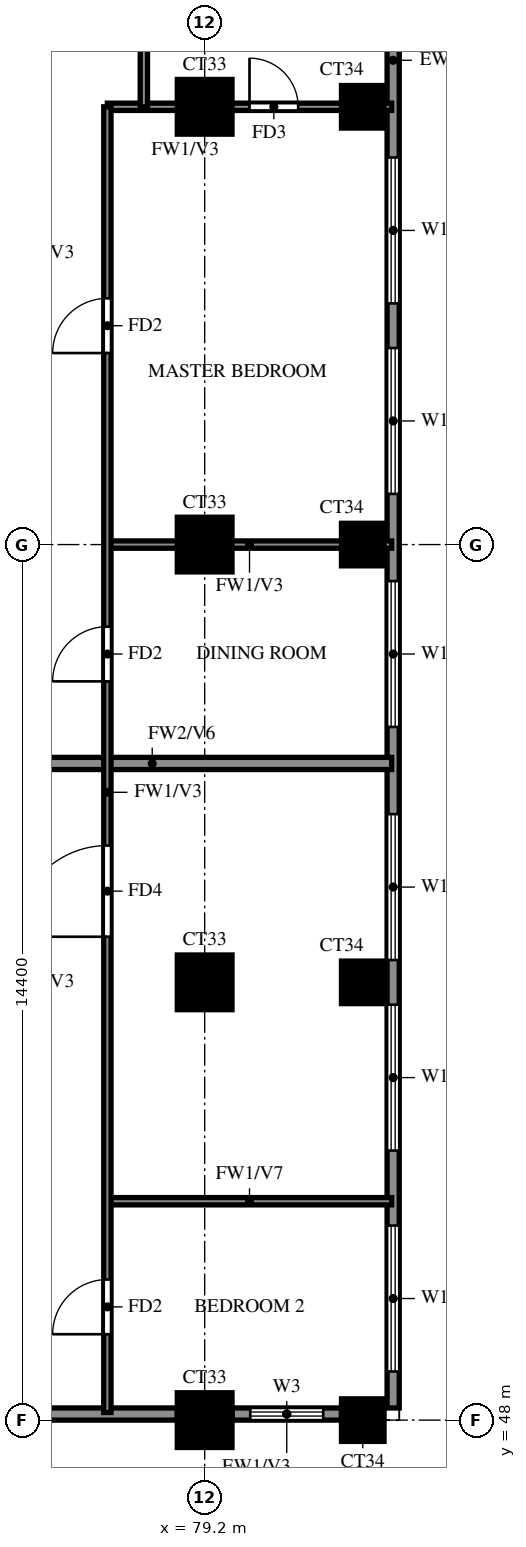
"""IFC4 building model, lengths in metres.
Left out: names, types, materials, properties, quantities, classifications, styles, units other than length and angle.
Written with IfcOpenShell. Run it as: python <this file> out.ifc"""

import sys

from ifc_helpers import new_model, si_unit, direction, frame, frame_2d, origin, origin_2d, place, context, subcontext, project, spatial, rectangle, extrude, source, transform, mapped, element, fill, save


model = new_model("IFC4")
c1 = context("Model", 3, precision=1e-05, world=origin(), true_north=direction((0.0, 1.0)))
c2 = subcontext(c1, "Body", "Model", "MODEL_VIEW")
j1 = project(units=[si_unit("LENGTHUNIT", "METRE"), si_unit("PLANEANGLEUNIT", "RADIAN")], contexts=[c1])
p1 = place(None, origin())
s1 = spatial("IfcSite", under=j1, at=p1, CompositionType="ELEMENT")
p2 = place(p1, origin())
s2 = spatial("IfcBuilding", under=s1, at=p2, CompositionType="ELEMENT")
p3 = place(p2, frame((0.0, 0.0, 215.0)))
s3 = spatial("IfcBuildingStorey", under=s2, at=p3, CompositionType="ELEMENT", Elevation=215.0)
m1 = source(origin(), c2, "Body", "SweptSolid", [
    extrude(rectangle(XDim=0.9, YDim=0.9, at=origin_2d()), origin(), (0.0, 0.0, 1.0), 3.22),
])
p4 = place(p3, frame((79.2, 48.0, 0.0), z_axis=(0.0, 0.0, 1.0), x_axis=(1.0, 0.0, 0.0)))
e1 = element("IfcColumn", 1, at=p4, inside=s3, PredefinedType="COLUMN", context=c2, shape_type="MappedRepresentation", body=[
    mapped(m1, transform((0.0, 0.0, 0.0))),
])
m2 = source(origin(), c2, "Body", "SweptSolid", [
    extrude(rectangle(XDim=0.7, YDim=0.7, at=origin_2d()), origin(), (0.0, 0.0, 1.0), 3.22),
])
p5 = place(p3, frame((81.8, 48.0, 0.0), z_axis=(0.0, 0.0, 1.0), x_axis=(1.0, 0.0, 0.0)))
e2 = element("IfcColumn", 2, at=p5, inside=s3, PredefinedType="COLUMN", context=c2, shape_type="MappedRepresentation", body=[
    mapped(m2, transform((0.0, 0.0, 0.0))),
])
p6 = place(p3, frame((79.2, 55.2, 0.0), z_axis=(0.0, 0.0, 1.0), x_axis=(1.0, 0.0, 0.0)))
e3 = element("IfcColumn", 3, at=p6, inside=s3, PredefinedType="COLUMN", context=c2, shape_type="MappedRepresentation", body=[
    mapped(m1, transform((0.0, 0.0, 0.0))),
])
p7 = place(p3, frame((81.8, 55.2, 0.0), z_axis=(0.0, 0.0, 1.0), x_axis=(1.0, 0.0, 0.0)))
e4 = element("IfcColumn", 4, at=p7, inside=s3, PredefinedType="COLUMN", context=c2, shape_type="MappedRepresentation", body=[
    mapped(m2, transform((0.0, 0.0, 0.0))),
])
p8 = place(p3, frame((79.2, 62.4, 0.0), z_axis=(0.0, 0.0, 1.0), x_axis=(1.0, 0.0, 0.0)))
e5 = element("IfcColumn", 5, at=p8, inside=s3, PredefinedType="COLUMN", context=c2, shape_type="MappedRepresentation", body=[
    mapped(m1, transform((0.0, 0.0, 0.0))),
])
p9 = place(p3, frame((81.8, 62.4, 0.0), z_axis=(0.0, 0.0, 1.0), x_axis=(1.0, 0.0, 0.0)))
e6 = element("IfcColumn", 6, at=p9, inside=s3, PredefinedType="COLUMN", context=c2, shape_type="MappedRepresentation", body=[
    mapped(m2, transform((0.0, 0.0, 0.0))),
])
p10 = place(p3, frame((79.2, 69.6, 0.0), z_axis=(0.0, 0.0, 1.0), x_axis=(1.0, 0.0, 0.0)))
e7 = element("IfcColumn", 7, at=p10, inside=s3, PredefinedType="COLUMN", context=c2, shape_type="MappedRepresentation", body=[
    mapped(m1, transform((0.0, 0.0, 0.0))),
])
p11 = place(p3, frame((81.8, 69.6, 0.0), z_axis=(0.0, 0.0, 1.0), x_axis=(1.0, 0.0, 0.0)))
e8 = element("IfcColumn", 8, at=p11, inside=s3, PredefinedType="COLUMN", context=c2, shape_type="MappedRepresentation", body=[
    mapped(m2, transform((0.0, 0.0, 0.0))),
])
p12 = place(p3, frame((81.907, 39.87, 0.0), z_axis=(0.0, 0.0, 1.0), x_axis=(-0.777936274417, 0.62834318087, 0.0)))
e9 = element("IfcWall", 9, at=p12, inside=s3, PredefinedType="SOLIDWALL", context=c2, shape_type="SweptSolid", body=[
    extrude(rectangle(XDim=13.099, YDim=0.2, at=frame_2d((6.549, 0.0))), origin(), (0.0, 0.0, 1.0), 3.22),
])
p13 = place(p12, frame((9.938, 0.0, 1.5)))
e10 = element("IfcOpeningElement", 10, at=p13, cuts=e9, PredefinedType="OPENING", context=c2, shape_type="SweptSolid", body=[
    extrude(rectangle(XDim=0.9, YDim=0.9, at=frame_2d((0.45, 0.45))), frame((0.0, 0.11, 0.0), z_axis=(0.0, -1.0, 0.0), x_axis=(1.0, 0.0, 0.0)), (0.0, 0.0, 1.0), 0.22),
])
p14 = place(p3, frame((71.987, 48.1, 0.0), z_axis=(0.0, 0.0, 1.0), x_axis=(1.0, 0.0, 0.0)))
e11 = element("IfcWall", 11, at=p14, inside=s3, PredefinedType="SOLIDWALL", context=c2, shape_type="SweptSolid", body=[
    extrude(rectangle(XDim=6.763, YDim=0.2, at=frame_2d((3.381, 0.0))), origin(), (0.0, 0.0, 1.0), 3.22),
])
p15 = place(p3, frame((79.65, 48.1, 0.0), z_axis=(0.0, 0.0, 1.0), x_axis=(1.0, 0.0, 0.0)))
e12 = element("IfcWall", 12, at=p15, inside=s3, PredefinedType="SOLIDWALL", context=c2, shape_type="SweptSolid", body=[
    extrude(rectangle(XDim=1.8, YDim=0.2, at=frame_2d((0.9, 0.0))), origin(), (0.0, 0.0, 1.0), 3.22),
])
p16 = place(p15, frame((0.3, 0.0, 0.6)))
e13 = element("IfcOpeningElement", 13, at=p16, cuts=e12, PredefinedType="OPENING", context=c2, shape_type="SweptSolid", body=[
    extrude(rectangle(XDim=1.2, YDim=2.4, at=frame_2d((0.6, 1.2))), frame((0.0, 0.11, 0.0), z_axis=(0.0, -1.0, 0.0), x_axis=(1.0, 0.0, 0.0)), (0.0, 0.0, 1.0), 0.22),
])
p17 = place(p3, frame((82.3, 48.2, 0.0), z_axis=(0.0, 0.0, 1.0), x_axis=(0.0, 1.0, 0.0)))
e14 = element("IfcWall", 14, at=p17, inside=s3, PredefinedType="SOLIDWALL", context=c2, shape_type="SweptSolid", body=[
    extrude(rectangle(XDim=28.6, YDim=0.2, at=frame_2d((14.3, 0.0))), origin(), (0.0, 0.0, 1.0), 3.22),
])
p18 = place(p17, frame((0.6, 0.0, 0.6)))
e15 = element("IfcOpeningElement", 15, at=p18, cuts=e14, PredefinedType="OPENING", context=c2, shape_type="SweptSolid", body=[
    extrude(rectangle(XDim=2.4, YDim=2.4, at=frame_2d((1.2, 1.2))), frame((0.0, 0.11, 0.0), z_axis=(0.0, -1.0, 0.0), x_axis=(1.0, 0.0, 0.0)), (0.0, 0.0, 1.0), 0.22),
])
p19 = place(p17, frame((4.233, 0.0, 0.6)))
e16 = element("IfcOpeningElement", 16, at=p19, cuts=e14, PredefinedType="OPENING", context=c2, shape_type="SweptSolid", body=[
    extrude(rectangle(XDim=2.4, YDim=2.4, at=frame_2d((1.2, 1.2))), frame((0.0, 0.11, 0.0), z_axis=(0.0, -1.0, 0.0), x_axis=(1.0, 0.0, 0.0)), (0.0, 0.0, 1.0), 0.22),
])
p20 = place(p17, frame((7.367, 0.0, 0.6)))
e17 = element("IfcOpeningElement", 17, at=p20, cuts=e14, PredefinedType="OPENING", context=c2, shape_type="SweptSolid", body=[
    extrude(rectangle(XDim=2.4, YDim=2.4, at=frame_2d((1.2, 1.2))), frame((0.0, 0.11, 0.0), z_axis=(0.0, -1.0, 0.0), x_axis=(1.0, 0.0, 0.0)), (0.0, 0.0, 1.0), 0.22),
])
p21 = place(p17, frame((11.2, 0.0, 0.6)))
e18 = element("IfcOpeningElement", 18, at=p21, cuts=e14, PredefinedType="OPENING", context=c2, shape_type="SweptSolid", body=[
    extrude(rectangle(XDim=2.4, YDim=2.4, at=frame_2d((1.2, 1.2))), frame((0.0, 0.11, 0.0), z_axis=(0.0, -1.0, 0.0), x_axis=(1.0, 0.0, 0.0)), (0.0, 0.0, 1.0), 0.22),
])
p22 = place(p17, frame((15.033, 0.0, 0.6)))
e19 = element("IfcOpeningElement", 19, at=p22, cuts=e14, PredefinedType="OPENING", context=c2, shape_type="SweptSolid", body=[
    extrude(rectangle(XDim=2.4, YDim=2.4, at=frame_2d((1.2, 1.2))), frame((0.0, 0.11, 0.0), z_axis=(0.0, -1.0, 0.0), x_axis=(1.0, 0.0, 0.0)), (0.0, 0.0, 1.0), 0.22),
])
p23 = place(p17, frame((18.167, 0.0, 0.6)))
e20 = element("IfcOpeningElement", 20, at=p23, cuts=e14, PredefinedType="OPENING", context=c2, shape_type="SweptSolid", body=[
    extrude(rectangle(XDim=2.4, YDim=2.4, at=frame_2d((1.2, 1.2))), frame((0.0, 0.11, 0.0), z_axis=(0.0, -1.0, 0.0), x_axis=(1.0, 0.0, 0.0)), (0.0, 0.0, 1.0), 0.22),
])
p24 = place(p17, frame((22.75, 0.0, 1.5)))
e21 = element("IfcOpeningElement", 21, at=p24, cuts=e14, PredefinedType="OPENING", context=c2, shape_type="SweptSolid", body=[
    extrude(rectangle(XDim=0.9, YDim=0.9, at=frame_2d((0.45, 0.45))), frame((0.0, 0.11, 0.0), z_axis=(0.0, -1.0, 0.0), x_axis=(1.0, 0.0, 0.0)), (0.0, 0.0, 1.0), 0.22),
])
p25 = place(p17, frame((25.5, 0.0, 0.6)))
e22 = element("IfcOpeningElement", 22, at=p25, cuts=e14, PredefinedType="OPENING", context=c2, shape_type="SweptSolid", body=[
    extrude(rectangle(XDim=2.4, YDim=2.4, at=frame_2d((1.2, 1.2))), frame((0.0, 0.11, 0.0), z_axis=(0.0, -1.0, 0.0), x_axis=(1.0, 0.0, 0.0)), (0.0, 0.0, 1.0), 0.22),
])
p26 = place(p3, frame((74.4, 58.8, 0.0), z_axis=(0.0, 0.0, 1.0), x_axis=(1.0, 0.0, 0.0)))
e23 = element("IfcWall", 23, at=p26, inside=s3, PredefinedType="SOLIDWALL", context=c2, shape_type="SweptSolid", body=[
    extrude(rectangle(XDim=7.875, YDim=0.2, at=frame_2d((3.938, 0.0))), origin(), (0.0, 0.0, 1.0), 2.32),
])
p27 = place(p3, frame((77.6, 51.6, 0.0), z_axis=(0.0, 0.0, 1.0), x_axis=(1.0, 0.0, 0.0)))
e24 = element("IfcWall", 24, at=p27, inside=s3, PredefinedType="PARTITIONING", context=c2, shape_type="SweptSolid", body=[
    extrude(rectangle(XDim=4.675, YDim=0.12, at=frame_2d((2.337, 0.0))), origin(), (0.0, 0.0, 1.0), 2.32),
])
p28 = place(p3, frame((77.6, 62.4, 0.0), z_axis=(0.0, 0.0, 1.0), x_axis=(1.0, 0.0, 0.0)))
e25 = element("IfcWall", 25, at=p28, inside=s3, PredefinedType="PARTITIONING", context=c2, shape_type="SweptSolid", body=[
    extrude(rectangle(XDim=4.675, YDim=0.12, at=frame_2d((2.337, 0.0))), origin(), (0.0, 0.0, 1.0), 3.22),
])
p29 = place(p3, frame((77.6, 69.6, 0.0), z_axis=(0.0, 0.0, 1.0), x_axis=(1.0, 0.0, 0.0)))
e26 = element("IfcWall", 26, at=p29, inside=s3, PredefinedType="PARTITIONING", context=c2, shape_type="SweptSolid", body=[
    extrude(rectangle(XDim=4.675, YDim=0.12, at=frame_2d((2.337, 0.0))), origin(), (0.0, 0.0, 1.0), 3.22),
])
p30 = place(p29, frame((2.337, 0.0, 0.0)))
e27 = element("IfcOpeningElement", 27, at=p30, cuts=e26, PredefinedType="OPENING", context=c2, shape_type="SweptSolid", body=[
    extrude(rectangle(XDim=0.8, YDim=2.1, at=frame_2d((0.4, 1.05))), frame((0.0, 0.07, 0.0), z_axis=(0.0, -1.0, 0.0), x_axis=(1.0, 0.0, 0.0)), (0.0, 0.0, 1.0), 0.14),
])
p31 = place(p3, frame((77.6, 48.125, 0.0), z_axis=(0.0, 0.0, 1.0), x_axis=(0.0, 1.0, 0.0)))
e28 = element("IfcWall", 28, at=p31, inside=s3, PredefinedType="PARTITIONING", context=c2, shape_type="SweptSolid", body=[
    extrude(rectangle(XDim=21.475, YDim=0.12, at=frame_2d((10.738, 0.0))), origin(), (0.0, 0.0, 1.0), 3.22),
])
p32 = place(p31, frame((1.288, 0.0, 0.0)))
e29 = element("IfcOpeningElement", 29, at=p32, cuts=e28, PredefinedType="OPENING", context=c2, shape_type="SweptSolid", body=[
    extrude(rectangle(XDim=0.9, YDim=2.1, at=frame_2d((0.45, 1.05))), frame((0.0, 0.07, 0.0), z_axis=(0.0, -1.0, 0.0), x_axis=(1.0, 0.0, 0.0)), (0.0, 0.0, 1.0), 0.14),
])
p33 = place(p31, frame((7.825, 0.0, 0.0)))
e30 = element("IfcOpeningElement", 30, at=p33, cuts=e28, PredefinedType="OPENING", context=c2, shape_type="SweptSolid", body=[
    extrude(rectangle(XDim=1.5, YDim=2.1, at=frame_2d((0.75, 1.05))), frame((0.0, 0.07, 0.0), z_axis=(0.0, -1.0, 0.0), x_axis=(1.0, 0.0, 0.0)), (0.0, 0.0, 1.0), 0.14),
])
p34 = place(p31, frame((12.025, 0.0, 0.0)))
e31 = element("IfcOpeningElement", 31, at=p34, cuts=e28, PredefinedType="OPENING", context=c2, shape_type="SweptSolid", body=[
    extrude(rectangle(XDim=0.9, YDim=2.1, at=frame_2d((0.45, 1.05))), frame((0.0, 0.07, 0.0), z_axis=(0.0, -1.0, 0.0), x_axis=(1.0, 0.0, 0.0)), (0.0, 0.0, 1.0), 0.14),
])
p35 = place(p31, frame((17.425, 0.0, 0.0)))
e32 = element("IfcOpeningElement", 32, at=p35, cuts=e28, PredefinedType="OPENING", context=c2, shape_type="SweptSolid", body=[
    extrude(rectangle(XDim=0.9, YDim=2.1, at=frame_2d((0.45, 1.05))), frame((0.0, 0.07, 0.0), z_axis=(0.0, -1.0, 0.0), x_axis=(1.0, 0.0, 0.0)), (0.0, 0.0, 1.0), 0.14),
])
p36 = place(p3, frame((78.2, 69.6, 0.0), z_axis=(0.0, 0.0, 1.0), x_axis=(0.0, 1.0, 0.0)))
e33 = element("IfcWall", 33, at=p36, inside=s3, PredefinedType="PARTITIONING", context=c2, shape_type="SweptSolid", body=[
    extrude(rectangle(XDim=3.6, YDim=0.12, at=frame_2d((1.8, 0.0))), origin(), (0.0, 0.0, 1.0), 3.22),
])
p37 = place(p16, origin())
e34 = element("IfcWindow", 34, at=p37, inside=s3, PartitioningType="SINGLE_PANEL", PredefinedType="WINDOW", context=c2, shape_type="SweptSolid", body=[
    extrude(rectangle(XDim=1.2, YDim=2.4, at=frame_2d((0.6, 1.2))), frame((0.0, 0.03, 0.0), z_axis=(0.0, -1.0, 0.0), x_axis=(1.0, 0.0, 0.0)), (0.0, 0.0, 1.0), 0.06),
])
fill(e13, e34)
p38 = place(p18, origin())
e35 = element("IfcWindow", 35, at=p38, inside=s3, PartitioningType="DOUBLE_PANEL_VERTICAL", PredefinedType="WINDOW", context=c2, shape_type="SweptSolid", body=[
    extrude(rectangle(XDim=2.4, YDim=2.4, at=frame_2d((1.2, 1.2))), frame((0.0, 0.03, 0.0), z_axis=(0.0, -1.0, 0.0), x_axis=(1.0, 0.0, 0.0)), (0.0, 0.0, 1.0), 0.06),
])
fill(e15, e35)
p39 = place(p19, origin())
e36 = element("IfcWindow", 36, at=p39, inside=s3, PartitioningType="DOUBLE_PANEL_VERTICAL", PredefinedType="WINDOW", context=c2, shape_type="SweptSolid", body=[
    extrude(rectangle(XDim=2.4, YDim=2.4, at=frame_2d((1.2, 1.2))), frame((0.0, 0.03, 0.0), z_axis=(0.0, -1.0, 0.0), x_axis=(1.0, 0.0, 0.0)), (0.0, 0.0, 1.0), 0.06),
])
fill(e16, e36)
p40 = place(p20, origin())
e37 = element("IfcWindow", 37, at=p40, inside=s3, PartitioningType="DOUBLE_PANEL_VERTICAL", PredefinedType="WINDOW", context=c2, shape_type="SweptSolid", body=[
    extrude(rectangle(XDim=2.4, YDim=2.4, at=frame_2d((1.2, 1.2))), frame((0.0, 0.03, 0.0), z_axis=(0.0, -1.0, 0.0), x_axis=(1.0, 0.0, 0.0)), (0.0, 0.0, 1.0), 0.06),
])
fill(e17, e37)
p41 = place(p21, origin())
e38 = element("IfcWindow", 38, at=p41, inside=s3, PartitioningType="DOUBLE_PANEL_VERTICAL", PredefinedType="WINDOW", context=c2, shape_type="SweptSolid", body=[
    extrude(rectangle(XDim=2.4, YDim=2.4, at=frame_2d((1.2, 1.2))), frame((0.0, 0.03, 0.0), z_axis=(0.0, -1.0, 0.0), x_axis=(1.0, 0.0, 0.0)), (0.0, 0.0, 1.0), 0.06),
])
fill(e18, e38)
p42 = place(p22, origin())
e39 = element("IfcWindow", 39, at=p42, inside=s3, PartitioningType="DOUBLE_PANEL_VERTICAL", PredefinedType="WINDOW", context=c2, shape_type="SweptSolid", body=[
    extrude(rectangle(XDim=2.4, YDim=2.4, at=frame_2d((1.2, 1.2))), frame((0.0, 0.03, 0.0), z_axis=(0.0, -1.0, 0.0), x_axis=(1.0, 0.0, 0.0)), (0.0, 0.0, 1.0), 0.06),
])
fill(e19, e39)
p43 = place(p23, origin())
e40 = element("IfcWindow", 40, at=p43, inside=s3, PartitioningType="DOUBLE_PANEL_VERTICAL", PredefinedType="WINDOW", context=c2, shape_type="SweptSolid", body=[
    extrude(rectangle(XDim=2.4, YDim=2.4, at=frame_2d((1.2, 1.2))), frame((0.0, 0.03, 0.0), z_axis=(0.0, -1.0, 0.0), x_axis=(1.0, 0.0, 0.0)), (0.0, 0.0, 1.0), 0.06),
])
fill(e20, e40)
p44 = place(p32, origin())
e41 = element("IfcDoor", 41, at=p44, inside=s3, OperationType="SINGLE_SWING_LEFT", PredefinedType="DOOR", context=c2, shape_type="SweptSolid", body=[
    extrude(rectangle(XDim=0.9, YDim=2.1, at=frame_2d((0.45, 1.05))), frame((0.0, 0.025, 0.0), z_axis=(0.0, -1.0, 0.0), x_axis=(1.0, 0.0, 0.0)), (0.0, 0.0, 1.0), 0.05),
])
fill(e29, e41)
p45 = place(p33, origin())
e42 = element("IfcDoor", 42, at=p45, inside=s3, OperationType="SINGLE_SWING_LEFT", PredefinedType="DOOR", context=c2, shape_type="SweptSolid", body=[
    extrude(rectangle(XDim=1.5, YDim=2.1, at=frame_2d((0.75, 1.05))), frame((0.0, 0.025, 0.0), z_axis=(0.0, -1.0, 0.0), x_axis=(1.0, 0.0, 0.0)), (0.0, 0.0, 1.0), 0.05),
])
fill(e30, e42)
p46 = place(p34, origin())
e43 = element("IfcDoor", 43, at=p46, inside=s3, OperationType="SINGLE_SWING_LEFT", PredefinedType="DOOR", context=c2, shape_type="SweptSolid", body=[
    extrude(rectangle(XDim=0.9, YDim=2.1, at=frame_2d((0.45, 1.05))), frame((0.0, 0.025, 0.0), z_axis=(0.0, -1.0, 0.0), x_axis=(1.0, 0.0, 0.0)), (0.0, 0.0, 1.0), 0.05),
])
fill(e31, e43)
p47 = place(p35, origin())
e44 = element("IfcDoor", 44, at=p47, inside=s3, OperationType="SINGLE_SWING_LEFT", PredefinedType="DOOR", context=c2, shape_type="SweptSolid", body=[
    extrude(rectangle(XDim=0.9, YDim=2.1, at=frame_2d((0.45, 1.05))), frame((0.0, 0.025, 0.0), z_axis=(0.0, -1.0, 0.0), x_axis=(1.0, 0.0, 0.0)), (0.0, 0.0, 1.0), 0.05),
])
fill(e32, e44)
p48 = place(p30, origin())
e45 = element("IfcDoor", 45, at=p48, inside=s3, OperationType="SINGLE_SWING_LEFT", PredefinedType="DOOR", context=c2, shape_type="SweptSolid", body=[
    extrude(rectangle(XDim=0.8, YDim=2.1, at=frame_2d((0.4, 1.05))), frame((0.0, 0.025, 0.0), z_axis=(0.0, -1.0, 0.0), x_axis=(1.0, 0.0, 0.0)), (0.0, 0.0, 1.0), 0.05),
])
fill(e27, e45)
save(model, sys.argv[1])
